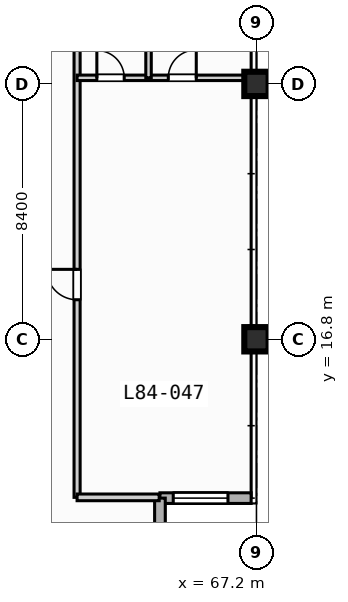
"""IFC4 building model, lengths in metres.
Left out: names, types, materials, properties, quantities, classifications, styles, units other than length and angle.
Written with IfcOpenShell. Run it as: python <this file> out.ifc"""

import sys

from ifc_helpers import new_model, si_unit, direction, frame, frame_2d, origin, origin_2d, place, context, subcontext, project, spatial, rectangle, extrude, element, fill, save


model = new_model("IFC4")
c1 = context("Model", 3, precision=1e-05, world=origin(), true_north=direction((0.0, 1.0)))
c2 = subcontext(c1, "Body", "Model", "MODEL_VIEW")
j1 = project(units=[si_unit("LENGTHUNIT", "METRE"), si_unit("PLANEANGLEUNIT", "RADIAN")], contexts=[c1])
p1 = place(None, origin())
s1 = spatial("IfcSite", under=j1, at=p1, CompositionType="ELEMENT")
p2 = place(p1, origin())
s2 = spatial("IfcBuilding", under=s1, at=p2, CompositionType="ELEMENT")
p3 = place(p2, frame((0.0, 0.0, 339.8)))
s3 = spatial("IfcBuildingStorey", under=s2, at=p3, CompositionType="ELEMENT", Elevation=339.8)
for number, where, z_axis, x_axis in (
    (1, (67.2, 16.8, 0.0), (0.0, 0.0, 1.0), (1.0, 0.0, 0.0)),
    (2, (67.2, 25.2, 0.0), (0.0, 0.0, 1.0), (1.0, 0.0, 0.0)),
):
    element("IfcColumn", number, at=place(p3, frame(where, z_axis=z_axis, x_axis=x_axis)), inside=s3, PredefinedType="COLUMN", context=c2, shape_type="SweptSolid", body=[
        extrude(rectangle(XDim=0.8, YDim=0.8, at=origin_2d()), origin(), (0.0, 0.0, 1.0), 3.9),
    ])
p4 = place(p3, frame((67.025, 11.575, 0.0), z_axis=(0.0, 0.0, 1.0), x_axis=(-1.0, 0.0, 0.0)))
e3 = element("IfcWall", 3, at=p4, inside=s3, PredefinedType="STANDARD", context=c2, shape_type="SweptSolid", body=[
    extrude(rectangle(XDim=3.0, YDim=0.35, at=frame_2d((1.5, 0.0))), origin(), (0.0, 0.0, 1.0), 3.67),
])
p5 = place(p4, frame((0.762, 0.0, 0.85)))
e4 = element("IfcOpeningElement", 4, at=p5, cuts=e3, PredefinedType="OPENING", context=c2, shape_type="SweptSolid", body=[
    extrude(rectangle(XDim=1.8, YDim=1.8, at=frame_2d((0.9, 0.9))), frame((0.0, 0.185, 0.0), z_axis=(0.0, -1.0, 0.0), x_axis=(1.0, 0.0, 0.0)), (0.0, 0.0, 1.0), 0.37),
])
p6 = place(p3, frame((64.025, 11.575, 0.0), z_axis=(0.0, 0.0, 1.0), x_axis=(0.0, -1.0, 0.0)))
e5 = element("IfcWall", 5, at=p6, inside=s3, PredefinedType="STANDARD", context=c2, shape_type="SweptSolid", body=[
    extrude(rectangle(XDim=3.0, YDim=0.35, at=frame_2d((1.5, 0.0))), origin(), (0.0, 0.0, 1.0), 3.67),
])
p7 = place(p3, frame((61.3, 11.6, 0.0), z_axis=(0.0, 0.0, 1.0), x_axis=(0.0, 1.0, 0.0)))
e6 = element("IfcWall", 6, at=p7, inside=s3, PredefinedType="PARTITIONING", context=c2, shape_type="SweptSolid", body=[
    extrude(rectangle(XDim=18.8, YDim=0.2, at=frame_2d((9.4, 0.0))), origin(), (0.0, 0.0, 1.0), 3.67),
])
p8 = place(p7, frame((6.5, 0.0, 0.0)))
e7 = element("IfcOpeningElement", 7, at=p8, cuts=e6, PredefinedType="OPENING", context=c2, shape_type="SweptSolid", body=[
    extrude(rectangle(XDim=1.0, YDim=2.15, at=frame_2d((0.5, 1.075))), frame((0.0, 0.11, 0.0), z_axis=(0.0, -1.0, 0.0), x_axis=(1.0, 0.0, 0.0)), (0.0, 0.0, 1.0), 0.22),
])
p9 = place(p3, frame((61.3, 25.4, 0.0), z_axis=(0.0, 0.0, 1.0), x_axis=(1.0, 0.0, 0.0)))
e8 = element("IfcWall", 8, at=p9, inside=s3, PredefinedType="PLUMBINGWALL", context=c2, shape_type="SweptSolid", body=[
    extrude(rectangle(XDim=5.5, YDim=0.18, at=frame_2d((2.75, 0.0))), origin(), (0.0, 0.0, 1.0), 3.07),
])
p10 = place(p9, frame((0.65, 0.0, 0.0)))
e9 = element("IfcOpeningElement", 9, at=p10, cuts=e8, PredefinedType="OPENING", context=c2, shape_type="SweptSolid", body=[
    extrude(rectangle(XDim=0.9, YDim=2.1, at=frame_2d((0.45, 1.05))), frame((0.0, 0.1, 0.0), z_axis=(0.0, -1.0, 0.0), x_axis=(1.0, 0.0, 0.0)), (0.0, 0.0, 1.0), 0.2),
])
p11 = place(p9, frame((3.0, 0.0, 0.0)))
e10 = element("IfcOpeningElement", 10, at=p11, cuts=e8, PredefinedType="OPENING", context=c2, shape_type="SweptSolid", body=[
    extrude(rectangle(XDim=0.92, YDim=2.1, at=frame_2d((0.46, 1.05))), frame((0.0, 0.1, 0.0), z_axis=(0.0, -1.0, 0.0), x_axis=(1.0, 0.0, 0.0)), (0.0, 0.0, 1.0), 0.2),
])
p12 = place(p3, frame((63.65, 25.4, 0.0), z_axis=(0.0, 0.0, 1.0), x_axis=(0.0, 1.0, 0.0)))
e11 = element("IfcWall", 11, at=p12, inside=s3, PredefinedType="PLUMBINGWALL", context=c2, shape_type="SweptSolid", body=[
    extrude(rectangle(XDim=5.0, YDim=0.18, at=frame_2d((2.5, 0.0))), origin(), (0.0, 0.0, 1.0), 3.67),
])
p13 = place(p3, frame((61.3, 11.6, 0.0), z_axis=(0.0, 0.0, 1.0), x_axis=(1.0, 0.0, 0.0)))
e12 = element("IfcWall", 12, at=p13, inside=s3, PredefinedType="PARTITIONING", context=c2, shape_type="SweptSolid", body=[
    extrude(rectangle(XDim=2.7, YDim=0.22, at=frame_2d((1.35, 0.0))), origin(), (0.0, 0.0, 1.0), 3.67),
])
p14 = place(p5, origin())
e13 = element("IfcWindow", 13, at=p14, inside=s3, PartitioningType="SINGLE_PANEL", PredefinedType="WINDOW", context=c2, shape_type="SweptSolid", body=[
    extrude(rectangle(XDim=1.8, YDim=1.8, at=frame_2d((0.9, 0.9))), frame((0.0, 0.03, 0.0), z_axis=(0.0, -1.0, 0.0), x_axis=(1.0, 0.0, 0.0)), (0.0, 0.0, 1.0), 0.06),
])
fill(e4, e13)
p15 = place(p8, origin())
e14 = element("IfcDoor", 14, at=p15, inside=s3, OperationType="SINGLE_SWING_RIGHT", PredefinedType="DOOR", context=c2, shape_type="SweptSolid", body=[
    extrude(rectangle(XDim=1.0, YDim=2.15, at=frame_2d((0.5, 1.075))), frame((0.0, 0.025, 0.0), z_axis=(0.0, -1.0, 0.0), x_axis=(1.0, 0.0, 0.0)), (0.0, 0.0, 1.0), 0.05),
])
fill(e7, e14)
p16 = place(p10, origin())
e15 = element("IfcDoor", 15, at=p16, inside=s3, OperationType="SINGLE_SWING_LEFT", PredefinedType="DOOR", context=c2, shape_type="SweptSolid", body=[
    extrude(rectangle(XDim=0.9, YDim=2.1, at=frame_2d((0.45, 1.05))), frame((0.0, 0.025, 0.0), z_axis=(0.0, -1.0, 0.0), x_axis=(1.0, 0.0, 0.0)), (0.0, 0.0, 1.0), 0.05),
])
fill(e9, e15)
p17 = place(p11, origin())
e16 = element("IfcDoor", 16, at=p17, inside=s3, OperationType="SINGLE_SWING_RIGHT", PredefinedType="DOOR", context=c2, shape_type="SweptSolid", body=[
    extrude(rectangle(XDim=0.92, YDim=2.1, at=frame_2d((0.46, 1.05))), frame((0.0, 0.025, 0.0), z_axis=(0.0, -1.0, 0.0), x_axis=(1.0, 0.0, 0.0)), (0.0, 0.0, 1.0), 0.05),
])
fill(e10, e16)
save(model, sys.argv[1])
